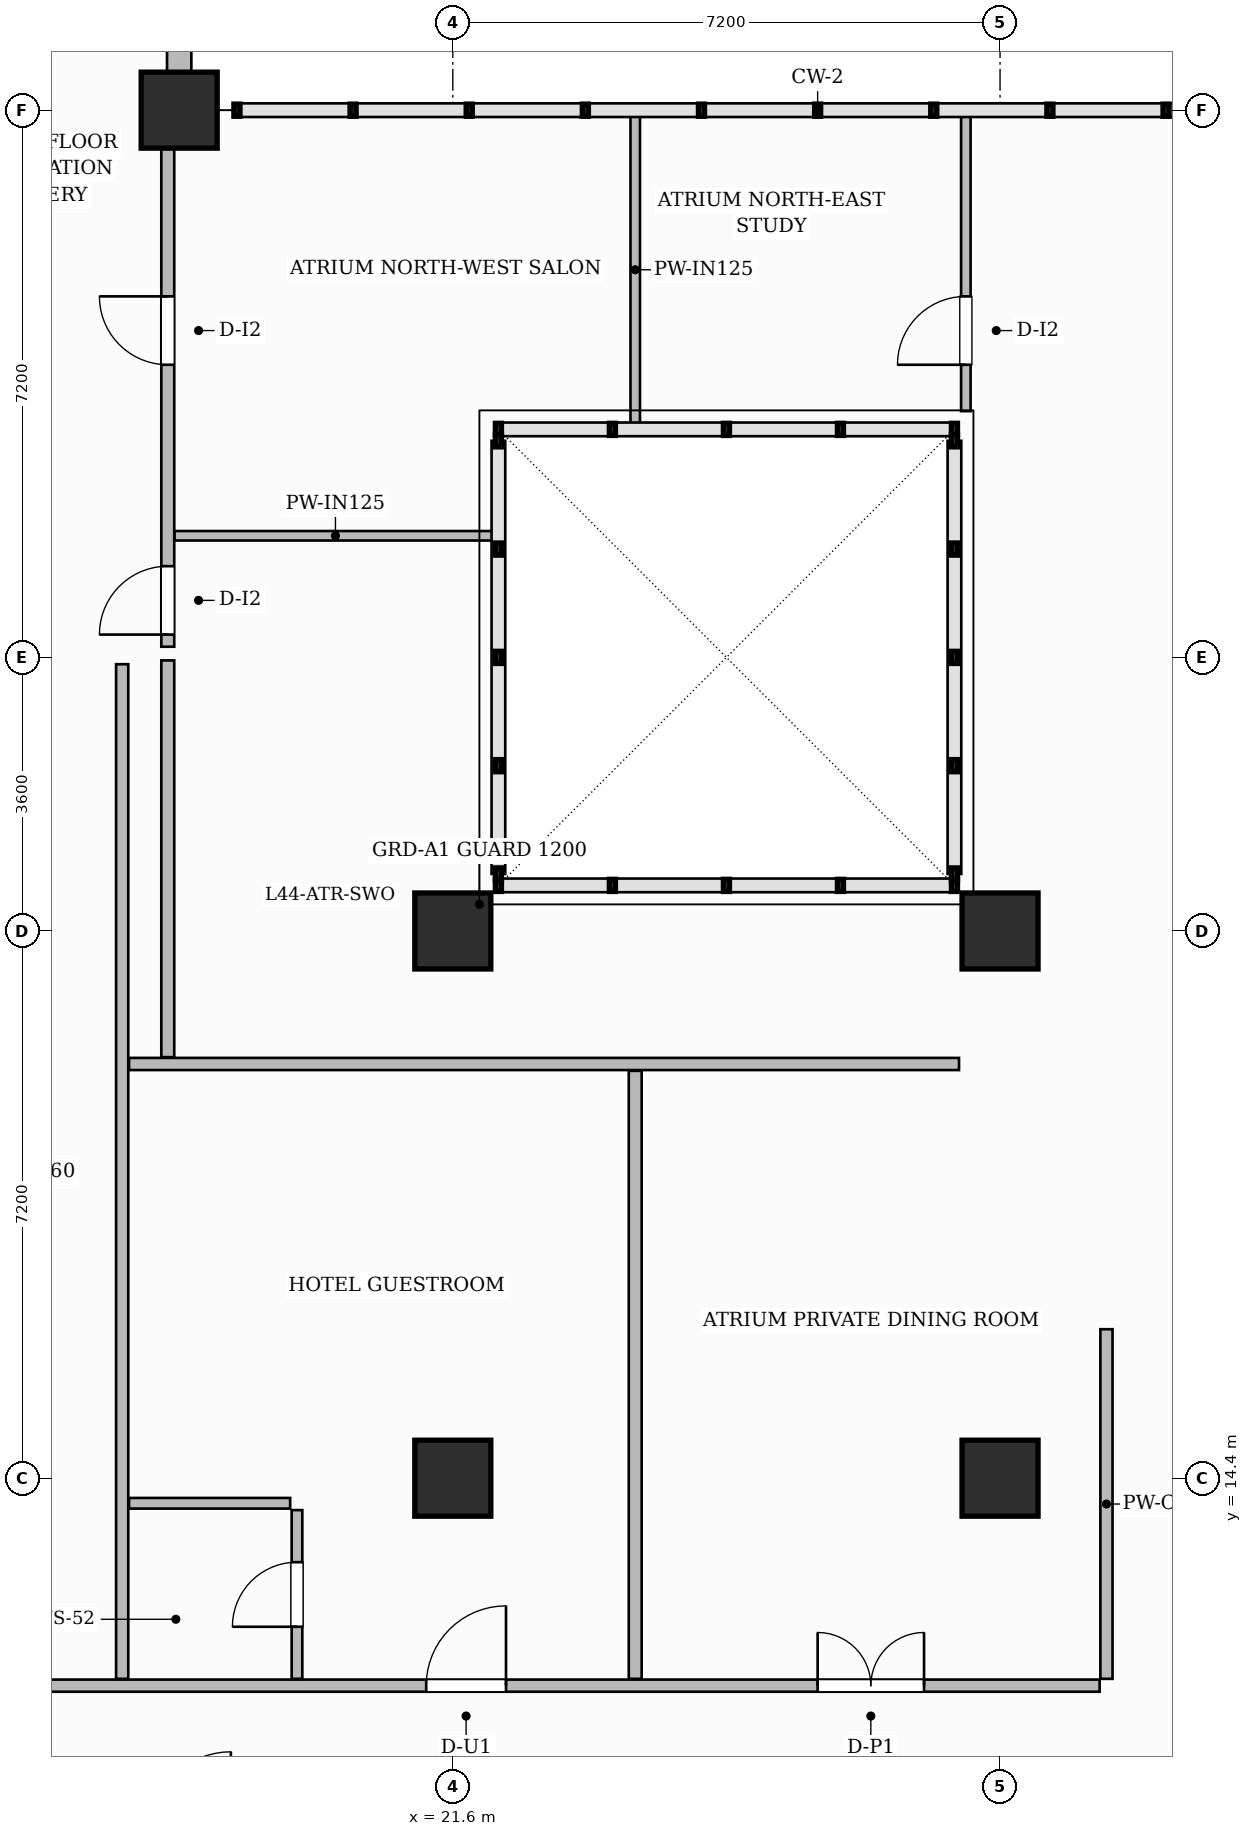
"""IFC4 building model, lengths in metres.
Left out: names, types, materials, properties, quantities, classifications, styles, units other than length and angle.
Written with IfcOpenShell. Run it as: python <this file> out.ifc"""

import sys

from ifc_helpers import new_model, si_unit, direction, frame, frame_2d, origin, origin_2d, place, context, subcontext, project, spatial, rectangle, extrude, source, transform, mapped, element, fill, save


model = new_model("IFC4")
c1 = context("Model", 3, precision=1e-05, world=origin(), true_north=direction((0.0, 1.0)))
c2 = subcontext(c1, "Body", "Model", "MODEL_VIEW")
j1 = project(units=[si_unit("LENGTHUNIT", "METRE"), si_unit("PLANEANGLEUNIT", "RADIAN")], contexts=[c1])
p1 = place(None, origin())
s1 = spatial("IfcSite", under=j1, at=p1, CompositionType="ELEMENT")
p2 = place(p1, origin())
s2 = spatial("IfcBuilding", under=s1, at=p2, CompositionType="ELEMENT")
p3 = place(p2, frame((0.0, 0.0, 177.25)))
s3 = spatial("IfcBuildingStorey", under=s2, at=p3, CompositionType="ELEMENT", Elevation=177.25)
m1 = source(origin(), c2, "Body", "SweptSolid", [
    extrude(rectangle(XDim=1.0, YDim=1.0, at=origin_2d()), origin(), (0.0, 0.0, 1.0), 3.85),
])
for number, where, z_axis, x_axis in (
    (1, (21.6, 14.4, 0.0), (0.0, 0.0, 1.0), (1.0, 0.0, 0.0)),
    (2, (21.6, 21.6, 0.0), (0.0, 0.0, 1.0), (1.0, 0.0, 0.0)),
    (3, (28.8, 14.4, 0.0), (0.0, 0.0, 1.0), (1.0, 0.0, 0.0)),
    (4, (28.8, 21.6, 0.0), (0.0, 0.0, 1.0), (1.0, 0.0, 0.0)),
    (5, (18.0, 32.4, 0.0), (0.0, 0.0, 1.0), (1.0, 0.0, 0.0)),
):
    element("IfcColumn", number, at=place(p3, frame(where, z_axis=z_axis, x_axis=x_axis)), inside=s3, PredefinedType="COLUMN", context=c2, shape_type="MappedRepresentation", body=[
        mapped(m1, transform((0.0, 0.0, 0.0), scale=1.0)),
    ])
p4 = place(p3, frame((14.568, 11.67, 0.0), z_axis=(0.0, 0.0, 1.0), x_axis=(1.0, 0.0, 0.0)))
e6 = element("IfcWall", 6, at=p4, inside=s3, PredefinedType="PARTITIONING", context=c2, shape_type="SweptSolid", body=[
    extrude(rectangle(XDim=15.542, YDim=0.16, at=frame_2d((7.771, 0.0))), origin(), (0.0, 0.0, 1.0), 3.6),
])
p5 = place(p4, frame((6.682, 0.0, 0.0)))
e7 = element("IfcOpeningElement", 7, at=p5, cuts=e6, PredefinedType="OPENING", context=c2, shape_type="SweptSolid", body=[
    extrude(rectangle(XDim=1.05, YDim=2.25, at=frame_2d((0.525, 1.125))), frame((0.0, 0.09, 0.0), z_axis=(0.0, -1.0, 0.0), x_axis=(1.0, 0.0, 0.0)), (0.0, 0.0, 1.0), 0.18),
])
p6 = place(p4, frame((11.832, 0.0, 0.0)))
e8 = element("IfcOpeningElement", 8, at=p6, cuts=e6, PredefinedType="OPENING", context=c2, shape_type="SweptSolid", body=[
    extrude(rectangle(XDim=1.4, YDim=2.35, at=frame_2d((0.7, 1.175))), frame((0.0, 0.09, 0.0), z_axis=(0.0, -1.0, 0.0), x_axis=(1.0, 0.0, 0.0)), (0.0, 0.0, 1.0), 0.18),
])
p7 = place(p3, frame((30.2, 11.76, 0.0), z_axis=(0.0, 0.0, 1.0), x_axis=(0.0, 1.0, 0.0)))
e9 = element("IfcWall", 9, at=p7, inside=s3, PredefinedType="PARTITIONING", context=c2, shape_type="SweptSolid", body=[
    extrude(rectangle(XDim=4.6, YDim=0.16, at=frame_2d((2.3, 0.0))), origin(), (0.0, 0.0, 1.0), 3.6),
])
p8 = place(p3, frame((17.25, 11.76, 0.0), z_axis=(0.0, 0.0, 1.0), x_axis=(0.0, 1.0, 0.0)))
e10 = element("IfcWall", 10, at=p8, inside=s3, PredefinedType="PARTITIONING", context=c2, shape_type="SweptSolid", body=[
    extrude(rectangle(XDim=13.35, YDim=0.16, at=frame_2d((6.675, 0.0))), origin(), (0.0, 0.0, 1.0), 3.6),
])
p9 = place(p3, frame((17.85, 19.94, 0.0), z_axis=(0.0, 0.0, 1.0), x_axis=(0.0, 1.0, 0.0)))
e11 = element("IfcWall", 11, at=p9, inside=s3, PredefinedType="PARTITIONING", context=c2, shape_type="SweptSolid", body=[
    extrude(rectangle(XDim=5.22, YDim=0.17, at=frame_2d((2.61, 0.0))), origin(), (0.0, 0.0, 1.0), 3.285),
])
p10 = place(p3, frame((17.85, 25.34, 0.0), z_axis=(0.0, 0.0, 1.0), x_axis=(0.0, 1.0, 0.0)))
e12 = element("IfcWall", 12, at=p10, inside=s3, PredefinedType="PARTITIONING", context=c2, shape_type="SweptSolid", body=[
    extrude(rectangle(XDim=6.87, YDim=0.17, at=frame_2d((3.435, 0.0))), origin(), (0.0, 0.0, 1.0), 3.6),
])
p11 = place(p10, frame((0.16, 0.0, 0.0)))
e13 = element("IfcOpeningElement", 13, at=p11, cuts=e12, PredefinedType="OPENING", context=c2, shape_type="SweptSolid", body=[
    extrude(rectangle(XDim=0.9, YDim=2.15, at=frame_2d((0.45, 1.075))), frame((0.0, 0.095, 0.0), z_axis=(0.0, -1.0, 0.0), x_axis=(1.0, 0.0, 0.0)), (0.0, 0.0, 1.0), 0.19),
])
p12 = place(p10, frame((3.71, 0.0, 0.0)))
e14 = element("IfcOpeningElement", 14, at=p12, cuts=e12, PredefinedType="OPENING", context=c2, shape_type="SweptSolid", body=[
    extrude(rectangle(XDim=0.9, YDim=2.15, at=frame_2d((0.45, 1.075))), frame((0.0, 0.095, 0.0), z_axis=(0.0, -1.0, 0.0), x_axis=(1.0, 0.0, 0.0)), (0.0, 0.0, 1.0), 0.19),
])
p13 = place(p3, frame((17.94, 26.8, 0.0), z_axis=(0.0, 0.0, 1.0), x_axis=(1.0, 0.0, 0.0)))
e15 = element("IfcWall", 15, at=p13, inside=s3, PredefinedType="PARTITIONING", context=c2, shape_type="SweptSolid", body=[
    extrude(rectangle(XDim=4.232, YDim=0.125, at=frame_2d((2.116, 0.0))), origin(), (0.0, 0.0, 1.0), 3.6),
])
p14 = place(p3, frame((24.0, 28.228, 0.0), z_axis=(0.0, 0.0, 1.0), x_axis=(0.0, 1.0, 0.0)))
e16 = element("IfcWall", 16, at=p14, inside=s3, PredefinedType="PARTITIONING", context=c2, shape_type="SweptSolid", body=[
    extrude(rectangle(XDim=4.144, YDim=0.125, at=frame_2d((2.072, 0.0))), origin(), (0.0, 0.0, 1.0), 3.6),
])
p15 = place(p3, frame((28.35, 28.44, 0.0), z_axis=(0.0, 0.0, 1.0), x_axis=(0.0, 1.0, 0.0)))
e17 = element("IfcWall", 17, at=p15, inside=s3, PredefinedType="PARTITIONING", context=c2, shape_type="SweptSolid", body=[
    extrude(rectangle(XDim=3.932, YDim=0.125, at=frame_2d((1.966, 0.0))), origin(), (0.0, 0.0, 1.0), 3.6),
])
p16 = place(p15, frame((0.61, 0.0, 0.0)))
e18 = element("IfcOpeningElement", 18, at=p16, cuts=e17, PredefinedType="OPENING", context=c2, shape_type="SweptSolid", body=[
    extrude(rectangle(XDim=0.9, YDim=2.15, at=frame_2d((0.45, 1.075))), frame((0.0, 0.073, 0.0), z_axis=(0.0, -1.0, 0.0), x_axis=(1.0, 0.0, 0.0)), (0.0, 0.0, 1.0), 0.145),
])
p17 = place(p3, frame((17.34, 19.85, 0.0), z_axis=(0.0, 0.0, 1.0), x_axis=(1.0, 0.0, 0.0)))
e19 = element("IfcWall", 19, at=p17, inside=s3, PredefinedType="PARTITIONING", context=c2, shape_type="SweptSolid", body=[
    extrude(rectangle(XDim=10.92, YDim=0.16, at=frame_2d((5.46, 0.0))), origin(), (0.0, 0.0, 1.0), 3.6),
])
p18 = place(p3, frame((24.0, 11.76, 0.0), z_axis=(0.0, 0.0, 1.0), x_axis=(0.0, 1.0, 0.0)))
e20 = element("IfcWall", 20, at=p18, inside=s3, PredefinedType="PARTITIONING", context=c2, shape_type="SweptSolid", body=[
    extrude(rectangle(XDim=8.0, YDim=0.17, at=frame_2d((4.0, 0.0))), origin(), (0.0, 0.0, 1.0), 3.6),
])
p19 = place(p3, frame((19.55, 11.76, 0.0), z_axis=(0.0, 0.0, 1.0), x_axis=(0.0, 1.0, 0.0)))
e21 = element("IfcWall", 21, at=p19, inside=s3, PredefinedType="PARTITIONING", context=c2, shape_type="SweptSolid", body=[
    extrude(rectangle(XDim=2.22, YDim=0.14, at=frame_2d((1.11, 0.0))), origin(), (0.0, 0.0, 1.0), 3.6),
])
p20 = place(p19, frame((0.685, 0.0, 0.0)))
e22 = element("IfcOpeningElement", 22, at=p20, cuts=e21, PredefinedType="OPENING", context=c2, shape_type="SweptSolid", body=[
    extrude(rectangle(XDim=0.85, YDim=2.1, at=frame_2d((0.425, 1.05))), frame((0.0, 0.08, 0.0), z_axis=(0.0, -1.0, 0.0), x_axis=(1.0, 0.0, 0.0)), (0.0, 0.0, 1.0), 0.16),
])
p21 = place(p3, frame((17.34, 14.07, 0.0), z_axis=(0.0, 0.0, 1.0), x_axis=(1.0, 0.0, 0.0)))
e23 = element("IfcWall", 23, at=p21, inside=s3, PredefinedType="PARTITIONING", context=c2, shape_type="SweptSolid", body=[
    extrude(rectangle(XDim=2.12, YDim=0.14, at=frame_2d((1.06, 0.0))), origin(), (0.0, 0.0, 1.0), 3.6),
])
p22 = place(p3, frame((18.0, 32.4, 0.0), z_axis=(0.0, 0.0, 1.0), x_axis=(0.0, 1.0, 0.0)))
e24 = element("IfcWall", 24, at=p22, inside=s3, PredefinedType="SOLIDWALL", context=c2, shape_type="SweptSolid", body=[
    extrude(rectangle(XDim=14.35, YDim=0.32, at=frame_2d((7.175, 0.0))), origin(), (0.0, 0.0, 1.0), 3.6),
])
p23 = place(p22, frame((0.85, 0.0, 0.0)))
e25 = element("IfcOpeningElement", 25, at=p23, cuts=e24, PredefinedType="OPENING", context=c2, shape_type="SweptSolid", body=[
    extrude(rectangle(XDim=1.2, YDim=2.2, at=frame_2d((0.6, 1.1))), frame((0.0, 0.17, 0.0), z_axis=(0.0, -1.0, 0.0), x_axis=(1.0, 0.0, 0.0)), (0.0, 0.0, 1.0), 0.34),
])
p24 = place(p22, frame((3.475, 0.0, 0.8)))
e26 = element("IfcOpeningElement", 26, at=p24, cuts=e24, PredefinedType="OPENING", context=c2, shape_type="SweptSolid", body=[
    extrude(rectangle(XDim=1.8, YDim=1.85, at=frame_2d((0.9, 0.925))), frame((0.0, 0.17, 0.0), z_axis=(0.0, -1.0, 0.0), x_axis=(1.0, 0.0, 0.0)), (0.0, 0.0, 1.0), 0.34),
])
p25 = place(p22, frame((8.525, 0.0, 0.8)))
e27 = element("IfcOpeningElement", 27, at=p25, cuts=e24, PredefinedType="OPENING", context=c2, shape_type="SweptSolid", body=[
    extrude(rectangle(XDim=1.8, YDim=1.85, at=frame_2d((0.9, 0.925))), frame((0.0, 0.17, 0.0), z_axis=(0.0, -1.0, 0.0), x_axis=(1.0, 0.0, 0.0)), (0.0, 0.0, 1.0), 0.34),
])
p26 = place(p22, frame((11.275, 0.0, 0.8)))
e28 = element("IfcOpeningElement", 28, at=p26, cuts=e24, PredefinedType="OPENING", context=c2, shape_type="SweptSolid", body=[
    extrude(rectangle(XDim=1.8, YDim=1.85, at=frame_2d((0.9, 0.925))), frame((0.0, 0.17, 0.0), z_axis=(0.0, -1.0, 0.0), x_axis=(1.0, 0.0, 0.0)), (0.0, 0.0, 1.0), 0.34),
])
m2 = source(origin(), c2, "Body", "SweptSolid", [
    extrude(rectangle(XDim=0.9, YDim=2.15, at=frame_2d((0.45, 1.075))), frame((0.0, 0.025, 0.0), z_axis=(0.0, -1.0, 0.0), x_axis=(1.0, 0.0, 0.0)), (0.0, 0.0, 1.0), 0.05),
])
p27 = place(p11, origin())
e29 = element("IfcDoor", 29, at=p27, inside=s3, OperationType="SINGLE_SWING_LEFT", PredefinedType="DOOR", context=c2, shape_type="MappedRepresentation", body=[
    mapped(m2, transform((0.0, 0.0, 0.0), scale=1.0)),
])
fill(e13, e29)
p28 = place(p12, origin())
e30 = element("IfcDoor", 30, at=p28, inside=s3, OperationType="SINGLE_SWING_RIGHT", PredefinedType="DOOR", context=c2, shape_type="MappedRepresentation", body=[
    mapped(m2, transform((0.0, 0.0, 0.0), scale=1.0)),
])
fill(e14, e30)
p29 = place(p16, origin())
e31 = element("IfcDoor", 31, at=p29, inside=s3, OperationType="SINGLE_SWING_LEFT", PredefinedType="DOOR", context=c2, shape_type="MappedRepresentation", body=[
    mapped(m2, transform((0.0, 0.0, 0.0), scale=1.0)),
])
fill(e18, e31)
m3 = source(origin(), c2, "Body", "SweptSolid", [
    extrude(rectangle(XDim=0.85, YDim=2.1, at=frame_2d((0.425, 1.05))), frame((0.0, 0.025, 0.0), z_axis=(0.0, -1.0, 0.0), x_axis=(1.0, 0.0, 0.0)), (0.0, 0.0, 1.0), 0.05),
])
p30 = place(p20, origin())
e32 = element("IfcDoor", 32, at=p30, inside=s3, OperationType="SINGLE_SWING_LEFT", PredefinedType="DOOR", context=c2, shape_type="MappedRepresentation", body=[
    mapped(m3, transform((0.0, 0.0, 0.0), scale=1.0)),
])
fill(e22, e32)
m4 = source(origin(), c2, "Body", "SweptSolid", [
    extrude(rectangle(XDim=1.05, YDim=2.25, at=frame_2d((0.525, 1.125))), frame((0.0, 0.025, 0.0), z_axis=(0.0, -1.0, 0.0), x_axis=(1.0, 0.0, 0.0)), (0.0, 0.0, 1.0), 0.05),
])
p31 = place(p5, origin())
e33 = element("IfcDoor", 33, at=p31, inside=s3, OperationType="SINGLE_SWING_RIGHT", PredefinedType="DOOR", context=c2, shape_type="MappedRepresentation", body=[
    mapped(m4, transform((0.0, 0.0, 0.0), scale=1.0)),
])
fill(e7, e33)
m5 = source(origin(), c2, "Body", "SweptSolid", [
    extrude(rectangle(XDim=1.4, YDim=2.35, at=frame_2d((0.7, 1.175))), frame((0.0, 0.025, 0.0), z_axis=(0.0, -1.0, 0.0), x_axis=(1.0, 0.0, 0.0)), (0.0, 0.0, 1.0), 0.05),
])
p32 = place(p6, origin())
e34 = element("IfcDoor", 34, at=p32, inside=s3, OperationType="DOUBLE_DOOR_SINGLE_SWING", PredefinedType="DOOR", context=c2, shape_type="MappedRepresentation", body=[
    mapped(m5, transform((0.0, 0.0, 0.0), scale=1.0)),
])
fill(e8, e34)
save(model, sys.argv[1])
